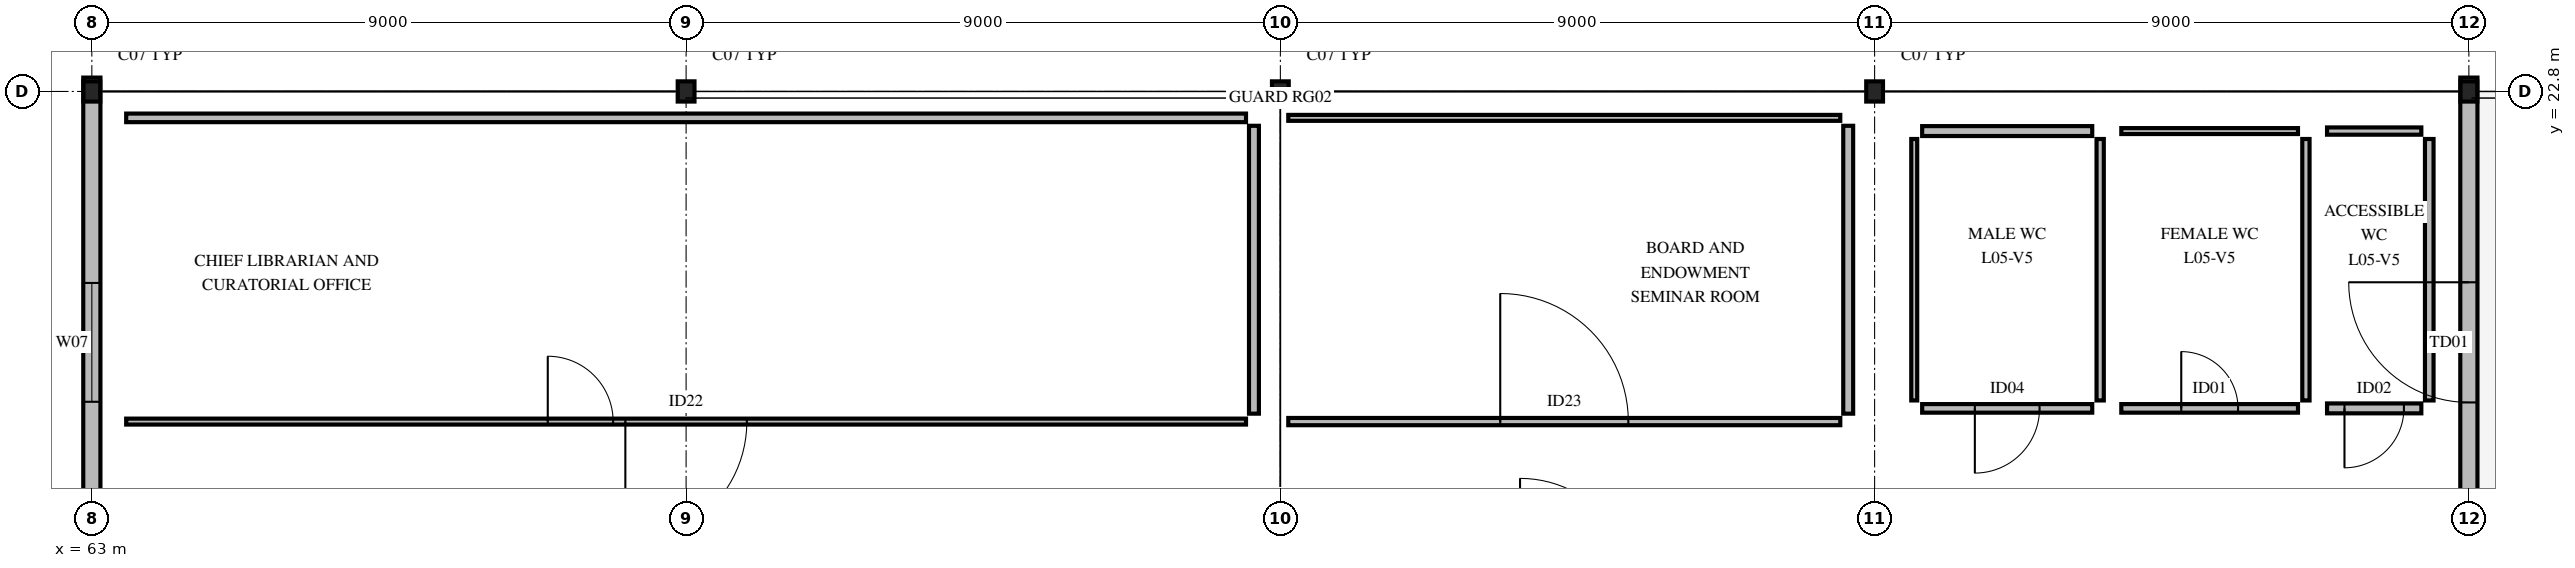
"""IFC4 building model, lengths in metres.
Left out: names, types, materials, properties, quantities, classifications, styles, units other than length and angle.
Written with IfcOpenShell. Run it as: python <this file> out.ifc"""

import sys

from ifc_helpers import new_model, si_unit, direction, frame, frame_2d, origin, origin_2d, place, context, subcontext, project, spatial, rectangle, i_section, extrude, element, fill, save


model = new_model("IFC4")
c1 = context("Model", 3, precision=1e-05, world=origin(), true_north=direction((0.0, 1.0)))
c2 = subcontext(c1, "Body", "Model", "MODEL_VIEW")
j1 = project(units=[si_unit("LENGTHUNIT", "METRE"), si_unit("PLANEANGLEUNIT", "RADIAN")], contexts=[c1])
p1 = place(None, origin())
s1 = spatial("IfcSite", under=j1, at=p1, CompositionType="ELEMENT")
p2 = place(p1, origin())
s2 = spatial("IfcBuilding", under=s1, at=p2, CompositionType="ELEMENT")
p3 = place(p2, frame((0.0, 0.0, 22.32)))
s3 = spatial("IfcBuildingStorey", under=s2, at=p3, CompositionType="ELEMENT", Elevation=22.32)
for number, where, z_axis, x_axis in (
    (1, (63.0, 22.8, 0.0), (0.0, 0.0, 1.0), (1.0, 0.0, 0.0)),
    (2, (72.0, 22.8, 0.0), (0.0, 0.0, 1.0), (1.0, 0.0, 0.0)),
    (3, (81.0, 22.8, 0.0), (0.0, 0.0, 1.0), (1.0, 0.0, 0.0)),
    (4, (90.0, 22.8, 0.0), (0.0, 0.0, 1.0), (1.0, 0.0, 0.0)),
    (5, (99.0, 22.8, 0.0), (0.0, 0.0, 1.0), (1.0, 0.0, 0.0)),
):
    element("IfcColumn", number, at=place(p3, frame(where, z_axis=z_axis, x_axis=x_axis)), inside=s3, PredefinedType="COLUMN", context=c2, shape_type="SweptSolid", body=[
        extrude(i_section(OverallWidth=0.254, OverallDepth=0.306, WebThickness=0.009, FlangeThickness=0.015, FilletRadius=0.015, at=origin_2d()), origin(), (0.0, 0.0, 1.0), 4.32),
    ])
p4 = place(p3, frame((99.0, 15.2, 0.0), z_axis=(0.0, 0.0, 1.0), x_axis=(0.0, 1.0, 0.0)))
e6 = element("IfcWall", 6, at=p4, inside=s3, PredefinedType="STANDARD", context=c2, shape_type="SweptSolid", body=[
    extrude(rectangle(XDim=7.81, YDim=0.26, at=frame_2d((3.905, 0.0))), origin(), (0.0, 0.0, 1.0), 3.559),
])
p5 = place(p4, frame((2.89, 0.0, 0.0)))
e7 = element("IfcOpeningElement", 7, at=p5, cuts=e6, PredefinedType="OPENING", context=c2, shape_type="SweptSolid", body=[
    extrude(rectangle(XDim=1.82, YDim=2.2, at=frame_2d((0.91, 1.1))), frame((0.0, 0.14, 0.0), z_axis=(0.0, -1.0, 0.0), x_axis=(1.0, 0.0, 0.0)), (0.0, 0.0, 1.0), 0.28),
])
p6 = place(p3, frame((63.0, 15.2, 0.0), z_axis=(0.0, 0.0, 1.0), x_axis=(0.0, 1.0, 0.0)))
e8 = element("IfcWall", 8, at=p6, inside=s3, PredefinedType="STANDARD", context=c2, shape_type="SweptSolid", body=[
    extrude(rectangle(XDim=7.81, YDim=0.26, at=frame_2d((3.905, 0.0))), origin(), (0.0, 0.0, 1.0), 3.559),
])
p7 = place(p6, frame((2.9, 0.0, 0.85)))
e9 = element("IfcOpeningElement", 9, at=p7, cuts=e8, PredefinedType="OPENING", context=c2, shape_type="SweptSolid", body=[
    extrude(rectangle(XDim=1.8, YDim=1.2, at=frame_2d((0.9, 0.6))), frame((0.0, 0.14, 0.0), z_axis=(0.0, -1.0, 0.0), x_axis=(1.0, 0.0, 0.0)), (0.0, 0.0, 1.0), 0.28),
])
p8 = place(p3, frame((63.52, 17.8, 0.0), z_axis=(0.0, 0.0, 1.0), x_axis=(1.0, 0.0, 0.0)))
e10 = element("IfcWall", 10, at=p8, inside=s3, PredefinedType="PARTITIONING", context=c2, shape_type="SweptSolid", body=[
    extrude(rectangle(XDim=16.96, YDim=0.09, at=frame_2d((8.48, 0.0))), origin(), (0.0, 0.0, 1.0), 3.711),
])
p9 = place(p8, frame((7.56, 0.0, 0.0)))
e11 = element("IfcOpeningElement", 11, at=p9, cuts=e10, PredefinedType="OPENING", context=c2, shape_type="SweptSolid", body=[
    extrude(rectangle(XDim=1.84, YDim=2.1, at=frame_2d((0.92, 1.05))), frame((0.0, 0.055, 0.0), z_axis=(0.0, -1.0, 0.0), x_axis=(1.0, 0.0, 0.0)), (0.0, 0.0, 1.0), 0.11),
])
p10 = place(p8, frame((6.385, 0.0, 0.0)))
e12 = element("IfcOpeningElement", 12, at=p10, cuts=e10, PredefinedType="OPENING", context=c2, shape_type="SweptSolid", body=[
    extrude(rectangle(XDim=0.99, YDim=2.15, at=frame_2d((0.495, 1.075))), frame((0.0, 0.055, 0.0), z_axis=(0.0, -1.0, 0.0), x_axis=(1.0, 0.0, 0.0)), (0.0, 0.0, 1.0), 0.11),
])
p11 = place(p3, frame((80.6, 17.92, 0.0), z_axis=(0.0, 0.0, 1.0), x_axis=(0.0, 1.0, 0.0)))
e13 = element("IfcWall", 13, at=p11, inside=s3, PredefinedType="PARTITIONING", context=c2, shape_type="SweptSolid", body=[
    extrude(rectangle(XDim=4.36, YDim=0.15, at=frame_2d((2.18, 0.0))), origin(), (0.0, 0.0, 1.0), 4.04),
])
p12 = place(p3, frame((63.52, 22.4, 0.0), z_axis=(0.0, 0.0, 1.0), x_axis=(1.0, 0.0, 0.0)))
e14 = element("IfcWall", 14, at=p12, inside=s3, PredefinedType="PARTITIONING", context=c2, shape_type="SweptSolid", body=[
    extrude(rectangle(XDim=16.96, YDim=0.13, at=frame_2d((8.48, 0.0))), origin(), (0.0, 0.0, 1.0), 4.04),
])
p13 = place(p3, frame((81.12, 17.8, 0.0), z_axis=(0.0, 0.0, 1.0), x_axis=(1.0, 0.0, 0.0)))
e15 = element("IfcWall", 15, at=p13, inside=s3, PredefinedType="PARTITIONING", context=c2, shape_type="SweptSolid", body=[
    extrude(rectangle(XDim=8.36, YDim=0.11, at=frame_2d((4.18, 0.0))), origin(), (0.0, 0.0, 1.0), 3.711),
])
p14 = place(p13, frame((3.21, 0.0, 0.0)))
e16 = element("IfcOpeningElement", 16, at=p14, cuts=e15, PredefinedType="OPENING", context=c2, shape_type="SweptSolid", body=[
    extrude(rectangle(XDim=1.94, YDim=2.1, at=frame_2d((0.97, 1.05))), frame((0.0, 0.065, 0.0), z_axis=(0.0, -1.0, 0.0), x_axis=(1.0, 0.0, 0.0)), (0.0, 0.0, 1.0), 0.13),
])
p15 = place(p3, frame((81.12, 22.4, 0.0), z_axis=(0.0, 0.0, 1.0), x_axis=(1.0, 0.0, 0.0)))
e17 = element("IfcWall", 17, at=p15, inside=s3, PredefinedType="PARTITIONING", context=c2, shape_type="SweptSolid", body=[
    extrude(rectangle(XDim=8.36, YDim=0.09, at=frame_2d((4.18, 0.0))), origin(), (0.0, 0.0, 1.0), 4.04),
])
p16 = place(p3, frame((89.6, 17.92, 0.0), z_axis=(0.0, 0.0, 1.0), x_axis=(0.0, 1.0, 0.0)))
e18 = element("IfcWall", 18, at=p16, inside=s3, PredefinedType="PARTITIONING", context=c2, shape_type="SweptSolid", body=[
    extrude(rectangle(XDim=4.36, YDim=0.15, at=frame_2d((2.18, 0.0))), origin(), (0.0, 0.0, 1.0), 4.04),
])
p17 = place(p3, frame((90.72, 18.0, 0.0), z_axis=(0.0, 0.0, 1.0), x_axis=(1.0, 0.0, 0.0)))
e19 = element("IfcWall", 19, at=p17, inside=s3, PredefinedType="PARTITIONING", context=c2, shape_type="SweptSolid", body=[
    extrude(rectangle(XDim=2.576, YDim=0.13, at=frame_2d((1.288, 0.0))), origin(), (0.0, 0.0, 1.0), 4.04),
])
p18 = place(p17, frame((0.798, 0.0, 0.0)))
e20 = element("IfcOpeningElement", 20, at=p18, cuts=e19, PredefinedType="OPENING", context=c2, shape_type="SweptSolid", body=[
    extrude(rectangle(XDim=0.98, YDim=2.06, at=frame_2d((0.49, 1.03))), frame((0.0, 0.075, 0.0), z_axis=(0.0, -1.0, 0.0), x_axis=(1.0, 0.0, 0.0)), (0.0, 0.0, 1.0), 0.15),
])
p19 = place(p3, frame((93.416, 18.12, 0.0), z_axis=(0.0, 0.0, 1.0), x_axis=(0.0, 1.0, 0.0)))
e21 = element("IfcWall", 21, at=p19, inside=s3, PredefinedType="PARTITIONING", context=c2, shape_type="SweptSolid", body=[
    extrude(rectangle(XDim=3.96, YDim=0.11, at=frame_2d((1.98, 0.0))), origin(), (0.0, 0.0, 1.0), 4.04),
])
p20 = place(p3, frame((90.6, 18.12, 0.0), z_axis=(0.0, 0.0, 1.0), x_axis=(0.0, 1.0, 0.0)))
e22 = element("IfcWall", 22, at=p20, inside=s3, PredefinedType="PARTITIONING", context=c2, shape_type="SweptSolid", body=[
    extrude(rectangle(XDim=3.96, YDim=0.09, at=frame_2d((1.98, 0.0))), origin(), (0.0, 0.0, 1.0), 4.04),
])
p21 = place(p3, frame((90.72, 22.2, 0.0), z_axis=(0.0, 0.0, 1.0), x_axis=(1.0, 0.0, 0.0)))
e23 = element("IfcWall", 23, at=p21, inside=s3, PredefinedType="PARTITIONING", context=c2, shape_type="SweptSolid", body=[
    extrude(rectangle(XDim=2.576, YDim=0.15, at=frame_2d((1.288, 0.0))), origin(), (0.0, 0.0, 1.0), 4.04),
])
p22 = place(p3, frame((93.736, 18.0, 0.0), z_axis=(0.0, 0.0, 1.0), x_axis=(1.0, 0.0, 0.0)))
e24 = element("IfcWall", 24, at=p22, inside=s3, PredefinedType="PARTITIONING", context=c2, shape_type="SweptSolid", body=[
    extrude(rectangle(XDim=2.676, YDim=0.13, at=frame_2d((1.338, 0.0))), origin(), (0.0, 0.0, 1.0), 4.04),
])
p23 = place(p22, frame((0.908, 0.0, 0.0)))
e25 = element("IfcOpeningElement", 25, at=p23, cuts=e24, PredefinedType="OPENING", context=c2, shape_type="SweptSolid", body=[
    extrude(rectangle(XDim=0.86, YDim=2.06, at=frame_2d((0.43, 1.03))), frame((0.0, 0.075, 0.0), z_axis=(0.0, -1.0, 0.0), x_axis=(1.0, 0.0, 0.0)), (0.0, 0.0, 1.0), 0.15),
])
p24 = place(p3, frame((96.532, 18.12, 0.0), z_axis=(0.0, 0.0, 1.0), x_axis=(0.0, 1.0, 0.0)))
e26 = element("IfcWall", 26, at=p24, inside=s3, PredefinedType="PARTITIONING", context=c2, shape_type="SweptSolid", body=[
    extrude(rectangle(XDim=3.96, YDim=0.11, at=frame_2d((1.98, 0.0))), origin(), (0.0, 0.0, 1.0), 4.04),
])
p25 = place(p3, frame((93.736, 22.2, 0.0), z_axis=(0.0, 0.0, 1.0), x_axis=(1.0, 0.0, 0.0)))
e27 = element("IfcWall", 27, at=p25, inside=s3, PredefinedType="PARTITIONING", context=c2, shape_type="SweptSolid", body=[
    extrude(rectangle(XDim=2.676, YDim=0.09, at=frame_2d((1.338, 0.0))), origin(), (0.0, 0.0, 1.0), 4.04),
])
p26 = place(p3, frame((96.852, 18.0, 0.0), z_axis=(0.0, 0.0, 1.0), x_axis=(1.0, 0.0, 0.0)))
e28 = element("IfcWall", 28, at=p26, inside=s3, PredefinedType="PARTITIONING", context=c2, shape_type="SweptSolid", body=[
    extrude(rectangle(XDim=1.428, YDim=0.15, at=frame_2d((0.714, 0.0))), origin(), (0.0, 0.0, 1.0), 4.04),
])
p27 = place(p26, frame((0.264, 0.0, 0.0)))
e29 = element("IfcOpeningElement", 29, at=p27, cuts=e28, PredefinedType="OPENING", context=c2, shape_type="SweptSolid", body=[
    extrude(rectangle(XDim=0.9, YDim=2.06, at=frame_2d((0.45, 1.03))), frame((0.0, 0.085, 0.0), z_axis=(0.0, -1.0, 0.0), x_axis=(1.0, 0.0, 0.0)), (0.0, 0.0, 1.0), 0.17),
])
p28 = place(p3, frame((98.4, 18.12, 0.0), z_axis=(0.0, 0.0, 1.0), x_axis=(0.0, 1.0, 0.0)))
e30 = element("IfcWall", 30, at=p28, inside=s3, PredefinedType="PARTITIONING", context=c2, shape_type="SweptSolid", body=[
    extrude(rectangle(XDim=3.96, YDim=0.13, at=frame_2d((1.98, 0.0))), origin(), (0.0, 0.0, 1.0), 4.04),
])
p29 = place(p3, frame((96.852, 22.2, 0.0), z_axis=(0.0, 0.0, 1.0), x_axis=(1.0, 0.0, 0.0)))
e31 = element("IfcWall", 31, at=p29, inside=s3, PredefinedType="PARTITIONING", context=c2, shape_type="SweptSolid", body=[
    extrude(rectangle(XDim=1.428, YDim=0.11, at=frame_2d((0.714, 0.0))), origin(), (0.0, 0.0, 1.0), 4.04),
])
p30 = place(p5, frame((1.82, 0.0, 0.0), z_axis=(0.0, 0.0, 1.0), x_axis=(-1.0, 0.0, 0.0)))
e32 = element("IfcDoor", 32, at=p30, inside=s3, OperationType="SINGLE_SWING_LEFT", PredefinedType="DOOR", context=c2, shape_type="SweptSolid", body=[
    extrude(rectangle(XDim=1.82, YDim=2.2, at=frame_2d((0.91, 1.1))), frame((0.0, 0.025, 0.0), z_axis=(0.0, -1.0, 0.0), x_axis=(1.0, 0.0, 0.0)), (0.0, 0.0, 1.0), 0.05),
])
fill(e7, e32)
p31 = place(p7, origin())
e33 = element("IfcWindow", 33, at=p31, inside=s3, PartitioningType="SINGLE_PANEL", PredefinedType="WINDOW", context=c2, shape_type="SweptSolid", body=[
    extrude(rectangle(XDim=1.8, YDim=1.2, at=frame_2d((0.9, 0.6))), frame((0.0, 0.03, 0.0), z_axis=(0.0, -1.0, 0.0), x_axis=(1.0, 0.0, 0.0)), (0.0, 0.0, 1.0), 0.06),
])
fill(e9, e33)
p32 = place(p9, origin())
e34 = element("IfcDoor", 34, at=p32, inside=s3, OperationType="SINGLE_SWING_RIGHT", PredefinedType="DOOR", context=c2, shape_type="SweptSolid", body=[
    extrude(rectangle(XDim=1.84, YDim=2.1, at=frame_2d((0.92, 1.05))), frame((0.0, 0.025, 0.0), z_axis=(0.0, -1.0, 0.0), x_axis=(1.0, 0.0, 0.0)), (0.0, 0.0, 1.0), 0.05),
])
fill(e11, e34)
p33 = place(p14, origin())
e35 = element("IfcDoor", 35, at=p33, inside=s3, OperationType="SINGLE_SWING_LEFT", PredefinedType="DOOR", context=c2, shape_type="SweptSolid", body=[
    extrude(rectangle(XDim=1.94, YDim=2.1, at=frame_2d((0.97, 1.05))), frame((0.0, 0.025, 0.0), z_axis=(0.0, -1.0, 0.0), x_axis=(1.0, 0.0, 0.0)), (0.0, 0.0, 1.0), 0.05),
])
fill(e16, e35)
p34 = place(p18, origin())
e36 = element("IfcDoor", 36, at=p34, inside=s3, OperationType="SINGLE_SWING_RIGHT", PredefinedType="DOOR", context=c2, shape_type="SweptSolid", body=[
    extrude(rectangle(XDim=0.98, YDim=2.06, at=frame_2d((0.49, 1.03))), frame((0.0, 0.025, 0.0), z_axis=(0.0, -1.0, 0.0), x_axis=(1.0, 0.0, 0.0)), (0.0, 0.0, 1.0), 0.05),
])
fill(e20, e36)
p35 = place(p23, origin())
e37 = element("IfcDoor", 37, at=p35, inside=s3, OperationType="SINGLE_SWING_LEFT", PredefinedType="DOOR", context=c2, shape_type="SweptSolid", body=[
    extrude(rectangle(XDim=0.86, YDim=2.06, at=frame_2d((0.43, 1.03))), frame((0.0, 0.025, 0.0), z_axis=(0.0, -1.0, 0.0), x_axis=(1.0, 0.0, 0.0)), (0.0, 0.0, 1.0), 0.05),
])
fill(e25, e37)
p36 = place(p27, origin())
e38 = element("IfcDoor", 38, at=p36, inside=s3, OperationType="SINGLE_SWING_RIGHT", PredefinedType="DOOR", context=c2, shape_type="SweptSolid", body=[
    extrude(rectangle(XDim=0.9, YDim=2.06, at=frame_2d((0.45, 1.03))), frame((0.0, 0.025, 0.0), z_axis=(0.0, -1.0, 0.0), x_axis=(1.0, 0.0, 0.0)), (0.0, 0.0, 1.0), 0.05),
])
fill(e29, e38)
p37 = place(p10, origin())
e39 = element("IfcDoor", 39, at=p37, inside=s3, OperationType="SINGLE_SWING_LEFT", PredefinedType="DOOR", context=c2, shape_type="SweptSolid", body=[
    extrude(rectangle(XDim=0.99, YDim=2.15, at=frame_2d((0.495, 1.075))), frame((0.0, 0.025, 0.0), z_axis=(0.0, -1.0, 0.0), x_axis=(1.0, 0.0, 0.0)), (0.0, 0.0, 1.0), 0.05),
])
fill(e12, e39)
save(model, sys.argv[1])
